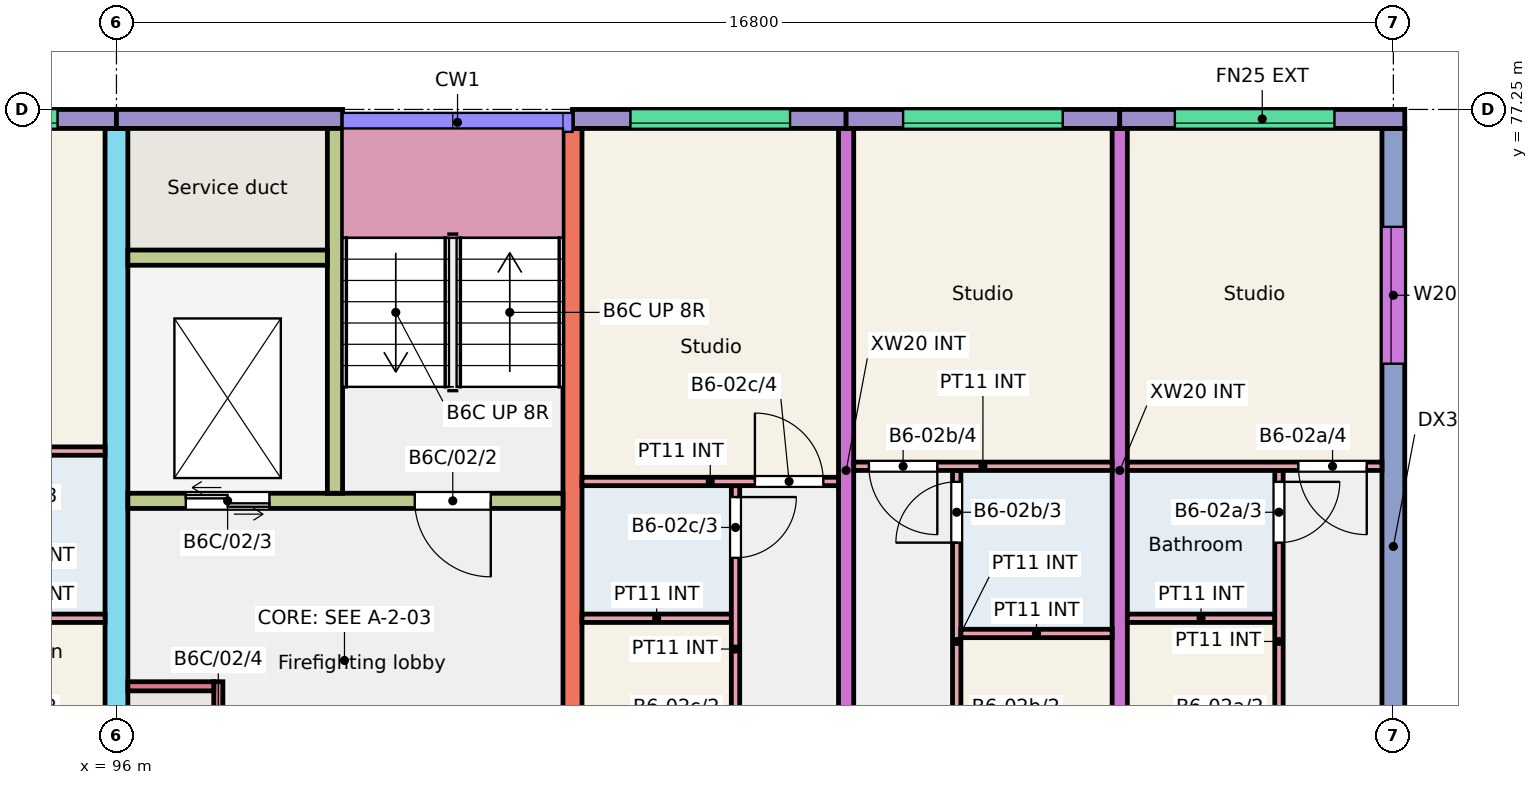
"""IFC4 building model, lengths in metres.
Left out: names, types, materials, properties, quantities, classifications, styles, units other than length and angle.
Written with IfcOpenShell. Run it as: python <this file> out.ifc"""

import sys

from ifc_helpers import new_model, si_unit, direction, frame, frame_2d, origin, place, context, subcontext, project, spatial, rectangle, extrude, element, fill, save


model = new_model("IFC4")
c1 = context("Model", 3, precision=1e-05, world=origin(), true_north=direction((0.0, 1.0)))
c2 = subcontext(c1, "Body", "Model", "MODEL_VIEW")
j1 = project(units=[si_unit("LENGTHUNIT", "METRE"), si_unit("PLANEANGLEUNIT", "RADIAN")], contexts=[c1])
p1 = place(None, origin())
s1 = spatial("IfcSite", under=j1, at=p1, CompositionType="ELEMENT")
p2 = place(p1, origin())
s2 = spatial("IfcBuilding", under=s1, at=p2, CompositionType="ELEMENT")
p3 = place(p2, frame((0.0, 0.0, 6.0)))
s3 = spatial("IfcBuildingStorey", under=s2, at=p3, CompositionType="ELEMENT", Elevation=6.0)
p4 = place(p3, frame((96.0, 66.0, 0.0), z_axis=(0.0, 0.0, 1.0), x_axis=(0.0, 1.0, 0.0)))
e1 = element("IfcWall", 1, at=p4, inside=s3, PredefinedType="SHEAR", context=c2, shape_type="SweptSolid", body=[
    extrude(rectangle(XDim=11.0, YDim=0.3, at=frame_2d((5.5, 0.0))), origin(), (0.0, 0.0, 1.0), 3.0),
])
p5 = place(p4, frame((0.3, 0.0, 0.0)))
e2 = element("IfcOpeningElement", 2, at=p5, cuts=e1, PredefinedType="OPENING", context=c2, shape_type="SweptSolid", body=[
    extrude(rectangle(XDim=1.2, YDim=2.1, at=frame_2d((0.6, 1.05))), frame((0.0, 0.16, 0.0), z_axis=(0.0, -1.0, 0.0), x_axis=(1.0, 0.0, 0.0)), (0.0, 0.0, 1.0), 0.32),
])
p6 = place(p3, frame((102.0, 68.0, 0.0), z_axis=(0.0, 0.0, 1.0), x_axis=(0.0, 1.0, 0.0)))
e3 = element("IfcWall", 3, at=p6, inside=s3, PredefinedType="SHEAR", context=c2, shape_type="SweptSolid", body=[
    extrude(rectangle(XDim=9.0, YDim=0.25, at=frame_2d((4.5, 0.0))), origin(), (0.0, 0.0, 1.0), 3.0),
])
for number, where, z_axis, x_axis in (
    (4, (105.6, 68.0, 0.0), (0.0, 0.0, 1.0), (0.0, 1.0, 0.0)),
    (5, (109.2, 68.0, 0.0), (0.0, 0.0, 1.0), (0.0, 1.0, 0.0)),
):
    element("IfcWall", number, at=place(p3, frame(where, z_axis=z_axis, x_axis=x_axis)), inside=s3, PredefinedType="SHEAR", context=c2, shape_type="SweptSolid", body=[
        extrude(rectangle(XDim=9.0, YDim=0.2, at=frame_2d((4.5, 0.0))), origin(), (0.0, 0.0, 1.0), 3.0),
    ])
p7 = place(p3, frame((112.8, 66.0, 0.0), z_axis=(0.0, 0.0, 1.0), x_axis=(0.0, 1.0, 0.0)))
e6 = element("IfcWall", 6, at=p7, inside=s3, PredefinedType="SHEAR", context=c2, shape_type="SweptSolid", body=[
    extrude(rectangle(XDim=11.0, YDim=0.3, at=frame_2d((5.5, 0.0))), origin(), (0.0, 0.0, 1.0), 3.0),
])
p8 = place(p7, frame((7.905, 0.0, 0.9)))
e7 = element("IfcOpeningElement", 7, at=p8, cuts=e6, PredefinedType="OPENING", context=c2, shape_type="SweptSolid", body=[
    extrude(rectangle(XDim=1.8, YDim=1.5, at=frame_2d((0.9, 0.75))), frame((0.0, 0.16, 0.0), z_axis=(0.0, -1.0, 0.0), x_axis=(1.0, 0.0, 0.0)), (0.0, 0.0, 1.0), 0.32),
])
p9 = place(p3, frame((92.4, 77.125, 0.0), z_axis=(0.0, 0.0, 1.0), x_axis=(1.0, 0.0, 0.0)))
e8 = element("IfcWall", 8, at=p9, inside=s3, PredefinedType="SOLIDWALL", context=c2, shape_type="SweptSolid", body=[
    extrude(rectangle(XDim=3.6, YDim=0.25, at=frame_2d((1.8, 0.0))), origin(), (0.0, 0.0, 1.0), 3.0),
])
p10 = place(p9, frame((0.725, 0.0, 1.2)))
e9 = element("IfcOpeningElement", 9, at=p10, cuts=e8, PredefinedType="OPENING", context=c2, shape_type="SweptSolid", body=[
    extrude(rectangle(XDim=2.1, YDim=1.2, at=frame_2d((1.05, 0.6))), frame((0.0, 0.135, 0.0), z_axis=(0.0, -1.0, 0.0), x_axis=(1.0, 0.0, 0.0)), (0.0, 0.0, 1.0), 0.27),
])
p11 = place(p3, frame((96.0, 77.125, 0.0), z_axis=(0.0, 0.0, 1.0), x_axis=(1.0, 0.0, 0.0)))
e10 = element("IfcWall", 10, at=p11, inside=s3, PredefinedType="SOLIDWALL", context=c2, shape_type="SweptSolid", body=[
    extrude(rectangle(XDim=2.975, YDim=0.25, at=frame_2d((1.488, 0.0))), origin(), (0.0, 0.0, 1.0), 3.0),
])
p12 = place(p3, frame((96.15, 72.1, 0.0), z_axis=(0.0, 0.0, 1.0), x_axis=(1.0, 0.0, 0.0)))
e11 = element("IfcWall", 11, at=p12, inside=s3, PredefinedType="SHEAR", context=c2, shape_type="SweptSolid", body=[
    extrude(rectangle(XDim=5.725, YDim=0.2, at=frame_2d((2.863, 0.0))), origin(), (0.0, 0.0, 1.0), 3.0),
])
p13 = place(p12, frame((3.775, 0.0, 0.0)))
e12 = element("IfcOpeningElement", 12, at=p13, cuts=e11, PredefinedType="OPENING", context=c2, shape_type="SweptSolid", body=[
    extrude(rectangle(XDim=1.0, YDim=2.1, at=frame_2d((0.5, 1.05))), frame((0.0, 0.11, 0.0), z_axis=(0.0, -1.0, 0.0), x_axis=(1.0, 0.0, 0.0)), (0.0, 0.0, 1.0), 0.22),
])
p14 = place(p12, frame((0.762, 0.0, 0.0)))
e13 = element("IfcOpeningElement", 13, at=p14, cuts=e11, PredefinedType="OPENING", context=c2, shape_type="SweptSolid", body=[
    extrude(rectangle(XDim=1.1, YDim=2.1, at=frame_2d((0.55, 1.05))), frame((0.0, 0.11, 0.0), z_axis=(0.0, -1.0, 0.0), x_axis=(1.0, 0.0, 0.0)), (0.0, 0.0, 1.0), 0.22),
])
p15 = place(p3, frame((98.875, 72.2, 0.0), z_axis=(0.0, 0.0, 1.0), x_axis=(0.0, 1.0, 0.0)))
e14 = element("IfcWall", 14, at=p15, inside=s3, PredefinedType="SHEAR", context=c2, shape_type="SweptSolid", body=[
    extrude(rectangle(XDim=4.8, YDim=0.2, at=frame_2d((2.4, 0.0))), origin(), (0.0, 0.0, 1.0), 3.0),
])
p16 = place(p3, frame((96.15, 75.3, 0.0), z_axis=(0.0, 0.0, 1.0), x_axis=(1.0, 0.0, 0.0)))
e15 = element("IfcWall", 15, at=p16, inside=s3, PredefinedType="SHEAR", context=c2, shape_type="SweptSolid", body=[
    extrude(rectangle(XDim=2.625, YDim=0.2, at=frame_2d((1.312, 0.0))), origin(), (0.0, 0.0, 1.0), 3.0),
])
p17 = place(p3, frame((97.34, 68.0, 0.0), z_axis=(0.0, 0.0, 1.0), x_axis=(0.0, 1.0, 0.0)))
e16 = element("IfcWall", 16, at=p17, inside=s3, PredefinedType="SHEAR", context=c2, shape_type="SweptSolid", body=[
    extrude(rectangle(XDim=1.72, YDim=0.12, at=frame_2d((0.86, 0.0))), origin(), (0.0, 0.0, 1.0), 3.0),
])
p18 = place(p17, frame((0.45, 0.0, 0.0)))
e17 = element("IfcOpeningElement", 17, at=p18, cuts=e16, PredefinedType="OPENING", context=c2, shape_type="SweptSolid", body=[
    extrude(rectangle(XDim=0.9, YDim=2.1, at=frame_2d((0.45, 1.05))), frame((0.0, 0.07, 0.0), z_axis=(0.0, -1.0, 0.0), x_axis=(1.0, 0.0, 0.0)), (0.0, 0.0, 1.0), 0.14),
])
p19 = place(p3, frame((96.15, 69.66, 0.0), z_axis=(0.0, 0.0, 1.0), x_axis=(1.0, 0.0, 0.0)))
e18 = element("IfcWall", 18, at=p19, inside=s3, PredefinedType="SHEAR", context=c2, shape_type="SweptSolid", body=[
    extrude(rectangle(XDim=1.13, YDim=0.12, at=frame_2d((0.565, 0.0))), origin(), (0.0, 0.0, 1.0), 3.0),
])
p20 = place(p3, frame((102.0, 77.125, 0.0), z_axis=(0.0, 0.0, 1.0), x_axis=(1.0, 0.0, 0.0)))
e19 = element("IfcWall", 19, at=p20, inside=s3, PredefinedType="SOLIDWALL", context=c2, shape_type="SweptSolid", body=[
    extrude(rectangle(XDim=3.6, YDim=0.25, at=frame_2d((1.8, 0.0))), origin(), (0.0, 0.0, 1.0), 3.0),
])
p21 = place(p20, frame((0.762, 0.0, 1.2)))
e20 = element("IfcOpeningElement", 20, at=p21, cuts=e19, PredefinedType="OPENING", context=c2, shape_type="SweptSolid", body=[
    extrude(rectangle(XDim=2.1, YDim=1.2, at=frame_2d((1.05, 0.6))), frame((0.0, 0.135, 0.0), z_axis=(0.0, -1.0, 0.0), x_axis=(1.0, 0.0, 0.0)), (0.0, 0.0, 1.0), 0.27),
])
p22 = place(p3, frame((105.6, 77.125, 0.0), z_axis=(0.0, 0.0, 1.0), x_axis=(1.0, 0.0, 0.0)))
e21 = element("IfcWall", 21, at=p22, inside=s3, PredefinedType="SOLIDWALL", context=c2, shape_type="SweptSolid", body=[
    extrude(rectangle(XDim=3.6, YDim=0.25, at=frame_2d((1.8, 0.0))), origin(), (0.0, 0.0, 1.0), 3.0),
])
p23 = place(p22, frame((0.75, 0.0, 1.2)))
e22 = element("IfcOpeningElement", 22, at=p23, cuts=e21, PredefinedType="OPENING", context=c2, shape_type="SweptSolid", body=[
    extrude(rectangle(XDim=2.1, YDim=1.2, at=frame_2d((1.05, 0.6))), frame((0.0, 0.135, 0.0), z_axis=(0.0, -1.0, 0.0), x_axis=(1.0, 0.0, 0.0)), (0.0, 0.0, 1.0), 0.27),
])
p24 = place(p3, frame((109.2, 77.125, 0.0), z_axis=(0.0, 0.0, 1.0), x_axis=(1.0, 0.0, 0.0)))
e23 = element("IfcWall", 23, at=p24, inside=s3, PredefinedType="SOLIDWALL", context=c2, shape_type="SweptSolid", body=[
    extrude(rectangle(XDim=3.75, YDim=0.25, at=frame_2d((1.875, 0.0))), origin(), (0.0, 0.0, 1.0), 3.0),
])
p25 = place(p24, frame((0.725, 0.0, 1.2)))
e24 = element("IfcOpeningElement", 24, at=p25, cuts=e23, PredefinedType="OPENING", context=c2, shape_type="SweptSolid", body=[
    extrude(rectangle(XDim=2.1, YDim=1.2, at=frame_2d((1.05, 0.6))), frame((0.0, 0.135, 0.0), z_axis=(0.0, -1.0, 0.0), x_axis=(1.0, 0.0, 0.0)), (0.0, 0.0, 1.0), 0.27),
])
p26 = place(p3, frame((93.91, 70.555, 0.0), z_axis=(0.0, 0.0, 1.0), x_axis=(1.0, 0.0, 0.0)))
e25 = element("IfcWall", 25, at=p26, inside=s3, PredefinedType="PARTITIONING", context=c2, shape_type="SweptSolid", body=[
    extrude(rectangle(XDim=1.94, YDim=0.11, at=frame_2d((0.97, 0.0))), origin(), (0.0, 0.0, 1.0), 2.8),
])
p27 = place(p3, frame((92.5, 72.755, 0.0), z_axis=(0.0, 0.0, 1.0), x_axis=(1.0, 0.0, 0.0)))
e26 = element("IfcWall", 26, at=p27, inside=s3, PredefinedType="PARTITIONING", context=c2, shape_type="SweptSolid", body=[
    extrude(rectangle(XDim=3.35, YDim=0.11, at=frame_2d((1.675, 0.0))), origin(), (0.0, 0.0, 1.0), 2.8),
])
p28 = place(p27, frame((0.2, 0.0, 0.0)))
e27 = element("IfcOpeningElement", 27, at=p28, cuts=e26, PredefinedType="OPENING", context=c2, shape_type="SweptSolid", body=[
    extrude(rectangle(XDim=0.9, YDim=2.1, at=frame_2d((0.45, 1.05))), frame((0.0, 0.065, 0.0), z_axis=(0.0, -1.0, 0.0), x_axis=(1.0, 0.0, 0.0)), (0.0, 0.0, 1.0), 0.13),
])
p29 = place(p3, frame((109.3, 70.555, 0.0), z_axis=(0.0, 0.0, 1.0), x_axis=(1.0, 0.0, 0.0)))
e28 = element("IfcWall", 28, at=p29, inside=s3, PredefinedType="PARTITIONING", context=c2, shape_type="SweptSolid", body=[
    extrude(rectangle(XDim=1.94, YDim=0.11, at=frame_2d((0.97, 0.0))), origin(), (0.0, 0.0, 1.0), 2.8),
])
p30 = place(p3, frame((111.295, 68.0, 0.0), z_axis=(0.0, 0.0, 1.0), x_axis=(0.0, 1.0, 0.0)))
e29 = element("IfcWall", 29, at=p30, inside=s3, PredefinedType="PARTITIONING", context=c2, shape_type="SweptSolid", body=[
    extrude(rectangle(XDim=4.5, YDim=0.11, at=frame_2d((2.25, 0.0))), origin(), (0.0, 0.0, 1.0), 2.8),
])
p31 = place(p30, frame((0.2, 0.0, 0.0)))
e30 = element("IfcOpeningElement", 30, at=p31, cuts=e29, PredefinedType="OPENING", context=c2, shape_type="SweptSolid", body=[
    extrude(rectangle(XDim=0.8, YDim=2.1, at=frame_2d((0.4, 1.05))), frame((0.0, 0.065, 0.0), z_axis=(0.0, -1.0, 0.0), x_axis=(1.0, 0.0, 0.0)), (0.0, 0.0, 1.0), 0.13),
])
p32 = place(p30, frame((3.55, 0.0, 0.0)))
e31 = element("IfcOpeningElement", 31, at=p32, cuts=e29, PredefinedType="OPENING", context=c2, shape_type="SweptSolid", body=[
    extrude(rectangle(XDim=0.8, YDim=2.1, at=frame_2d((0.4, 1.05))), frame((0.0, 0.065, 0.0), z_axis=(0.0, -1.0, 0.0), x_axis=(1.0, 0.0, 0.0)), (0.0, 0.0, 1.0), 0.13),
])
p33 = place(p3, frame((109.3, 72.555, 0.0), z_axis=(0.0, 0.0, 1.0), x_axis=(1.0, 0.0, 0.0)))
e32 = element("IfcWall", 32, at=p33, inside=s3, PredefinedType="PARTITIONING", context=c2, shape_type="SweptSolid", body=[
    extrude(rectangle(XDim=3.35, YDim=0.11, at=frame_2d((1.675, 0.0))), origin(), (0.0, 0.0, 1.0), 2.8),
])
p34 = place(p33, frame((2.25, 0.0, 0.0)))
e33 = element("IfcOpeningElement", 33, at=p34, cuts=e32, PredefinedType="OPENING", context=c2, shape_type="SweptSolid", body=[
    extrude(rectangle(XDim=0.9, YDim=2.1, at=frame_2d((0.45, 1.05))), frame((0.0, 0.065, 0.0), z_axis=(0.0, -1.0, 0.0), x_axis=(1.0, 0.0, 0.0)), (0.0, 0.0, 1.0), 0.13),
])
p35 = place(p3, frame((107.055, 68.0, 0.0), z_axis=(0.0, 0.0, 1.0), x_axis=(0.0, 1.0, 0.0)))
e34 = element("IfcWall", 34, at=p35, inside=s3, PredefinedType="PARTITIONING", context=c2, shape_type="SweptSolid", body=[
    extrude(rectangle(XDim=4.5, YDim=0.11, at=frame_2d((2.25, 0.0))), origin(), (0.0, 0.0, 1.0), 2.8),
])
p36 = place(p35, frame((0.2, 0.0, 0.0)))
e35 = element("IfcOpeningElement", 35, at=p36, cuts=e34, PredefinedType="OPENING", context=c2, shape_type="SweptSolid", body=[
    extrude(rectangle(XDim=0.8, YDim=2.1, at=frame_2d((0.4, 1.05))), frame((0.0, 0.065, 0.0), z_axis=(0.0, -1.0, 0.0), x_axis=(1.0, 0.0, 0.0)), (0.0, 0.0, 1.0), 0.13),
])
p37 = place(p35, frame((3.55, 0.0, 0.0)))
e36 = element("IfcOpeningElement", 36, at=p37, cuts=e34, PredefinedType="OPENING", context=c2, shape_type="SweptSolid", body=[
    extrude(rectangle(XDim=0.8, YDim=2.1, at=frame_2d((0.4, 1.05))), frame((0.0, 0.065, 0.0), z_axis=(0.0, -1.0, 0.0), x_axis=(1.0, 0.0, 0.0)), (0.0, 0.0, 1.0), 0.13),
])
p38 = place(p3, frame((107.11, 70.355, 0.0), z_axis=(0.0, 0.0, 1.0), x_axis=(1.0, 0.0, 0.0)))
e37 = element("IfcWall", 37, at=p38, inside=s3, PredefinedType="PARTITIONING", context=c2, shape_type="SweptSolid", body=[
    extrude(rectangle(XDim=1.99, YDim=0.11, at=frame_2d((0.995, 0.0))), origin(), (0.0, 0.0, 1.0), 2.8),
])
p39 = place(p3, frame((105.7, 72.555, 0.0), z_axis=(0.0, 0.0, 1.0), x_axis=(1.0, 0.0, 0.0)))
e38 = element("IfcWall", 38, at=p39, inside=s3, PredefinedType="PARTITIONING", context=c2, shape_type="SweptSolid", body=[
    extrude(rectangle(XDim=3.4, YDim=0.11, at=frame_2d((1.7, 0.0))), origin(), (0.0, 0.0, 1.0), 2.8),
])
p40 = place(p39, frame((0.2, 0.0, 0.0)))
e39 = element("IfcOpeningElement", 39, at=p40, cuts=e38, PredefinedType="OPENING", context=c2, shape_type="SweptSolid", body=[
    extrude(rectangle(XDim=0.9, YDim=2.1, at=frame_2d((0.45, 1.05))), frame((0.0, 0.065, 0.0), z_axis=(0.0, -1.0, 0.0), x_axis=(1.0, 0.0, 0.0)), (0.0, 0.0, 1.0), 0.13),
])
p41 = place(p3, frame((102.125, 70.555, 0.0), z_axis=(0.0, 0.0, 1.0), x_axis=(1.0, 0.0, 0.0)))
e40 = element("IfcWall", 40, at=p41, inside=s3, PredefinedType="PARTITIONING", context=c2, shape_type="SweptSolid", body=[
    extrude(rectangle(XDim=1.965, YDim=0.11, at=frame_2d((0.982, 0.0))), origin(), (0.0, 0.0, 1.0), 2.8),
])
p42 = place(p3, frame((104.145, 68.0, 0.0), z_axis=(0.0, 0.0, 1.0), x_axis=(0.0, 1.0, 0.0)))
e41 = element("IfcWall", 41, at=p42, inside=s3, PredefinedType="PARTITIONING", context=c2, shape_type="SweptSolid", body=[
    extrude(rectangle(XDim=4.3, YDim=0.11, at=frame_2d((2.15, 0.0))), origin(), (0.0, 0.0, 1.0), 2.8),
])
p43 = place(p42, frame((0.2, 0.0, 0.0)))
e42 = element("IfcOpeningElement", 42, at=p43, cuts=e41, PredefinedType="OPENING", context=c2, shape_type="SweptSolid", body=[
    extrude(rectangle(XDim=0.8, YDim=2.1, at=frame_2d((0.4, 1.05))), frame((0.0, 0.065, 0.0), z_axis=(0.0, -1.0, 0.0), x_axis=(1.0, 0.0, 0.0)), (0.0, 0.0, 1.0), 0.13),
])
p44 = place(p42, frame((3.35, 0.0, 0.0)))
e43 = element("IfcOpeningElement", 43, at=p44, cuts=e41, PredefinedType="OPENING", context=c2, shape_type="SweptSolid", body=[
    extrude(rectangle(XDim=0.8, YDim=2.1, at=frame_2d((0.4, 1.05))), frame((0.0, 0.065, 0.0), z_axis=(0.0, -1.0, 0.0), x_axis=(1.0, 0.0, 0.0)), (0.0, 0.0, 1.0), 0.13),
])
p45 = place(p3, frame((102.125, 72.355, 0.0), z_axis=(0.0, 0.0, 1.0), x_axis=(1.0, 0.0, 0.0)))
e44 = element("IfcWall", 44, at=p45, inside=s3, PredefinedType="PARTITIONING", context=c2, shape_type="SweptSolid", body=[
    extrude(rectangle(XDim=3.375, YDim=0.11, at=frame_2d((1.688, 0.0))), origin(), (0.0, 0.0, 1.0), 2.8),
])
p46 = place(p45, frame((2.275, 0.0, 0.0)))
e45 = element("IfcOpeningElement", 45, at=p46, cuts=e44, PredefinedType="OPENING", context=c2, shape_type="SweptSolid", body=[
    extrude(rectangle(XDim=0.9, YDim=2.1, at=frame_2d((0.45, 1.05))), frame((0.0, 0.065, 0.0), z_axis=(0.0, -1.0, 0.0), x_axis=(1.0, 0.0, 0.0)), (0.0, 0.0, 1.0), 0.13),
])
p47 = place(p10, origin())
e46 = element("IfcWindow", 46, at=p47, inside=s3, PartitioningType="SINGLE_PANEL", PredefinedType="WINDOW", context=c2, shape_type="SweptSolid", body=[
    extrude(rectangle(XDim=2.1, YDim=1.2, at=frame_2d((1.05, 0.6))), frame((0.0, -0.025, 0.0), z_axis=(0.0, -1.0, 0.0), x_axis=(1.0, 0.0, 0.0)), (0.0, 0.0, 1.0), 0.06),
])
fill(e9, e46)
p48 = place(p25, origin())
e47 = element("IfcWindow", 47, at=p48, inside=s3, PartitioningType="SINGLE_PANEL", PredefinedType="WINDOW", context=c2, shape_type="SweptSolid", body=[
    extrude(rectangle(XDim=2.1, YDim=1.2, at=frame_2d((1.05, 0.6))), frame((0.0, -0.025, 0.0), z_axis=(0.0, -1.0, 0.0), x_axis=(1.0, 0.0, 0.0)), (0.0, 0.0, 1.0), 0.06),
])
fill(e24, e47)
p49 = place(p8, origin())
e48 = element("IfcWindow", 48, at=p49, inside=s3, PartitioningType="SINGLE_PANEL", PredefinedType="WINDOW", context=c2, shape_type="SweptSolid", body=[
    extrude(rectangle(XDim=1.8, YDim=1.5, at=frame_2d((0.9, 0.75))), frame((0.0, 0.06, 0.0), z_axis=(0.0, -1.0, 0.0), x_axis=(1.0, 0.0, 0.0)), (0.0, 0.0, 1.0), 0.06),
])
fill(e7, e48)
p50 = place(p23, origin())
e49 = element("IfcWindow", 49, at=p50, inside=s3, PartitioningType="SINGLE_PANEL", PredefinedType="WINDOW", context=c2, shape_type="SweptSolid", body=[
    extrude(rectangle(XDim=2.1, YDim=1.2, at=frame_2d((1.05, 0.6))), frame((0.0, -0.025, 0.0), z_axis=(0.0, -1.0, 0.0), x_axis=(1.0, 0.0, 0.0)), (0.0, 0.0, 1.0), 0.06),
])
fill(e22, e49)
p51 = place(p21, origin())
e50 = element("IfcWindow", 50, at=p51, inside=s3, PartitioningType="SINGLE_PANEL", PredefinedType="WINDOW", context=c2, shape_type="SweptSolid", body=[
    extrude(rectangle(XDim=2.1, YDim=1.2, at=frame_2d((1.05, 0.6))), frame((0.0, -0.025, 0.0), z_axis=(0.0, -1.0, 0.0), x_axis=(1.0, 0.0, 0.0)), (0.0, 0.0, 1.0), 0.06),
])
fill(e20, e50)
p52 = place(p32, origin())
e51 = element("IfcDoor", 51, at=p52, inside=s3, OperationType="SINGLE_SWING_RIGHT", PredefinedType="DOOR", context=c2, shape_type="SweptSolid", body=[
    extrude(rectangle(XDim=0.8, YDim=2.1, at=frame_2d((0.4, 1.05))), frame((0.0, 0.025, 0.0), z_axis=(0.0, -1.0, 0.0), x_axis=(1.0, 0.0, 0.0)), (0.0, 0.0, 1.0), 0.05),
])
fill(e31, e51)
p53 = place(p34, origin())
e52 = element("IfcDoor", 52, at=p53, inside=s3, OperationType="SINGLE_SWING_RIGHT", PredefinedType="DOOR", context=c2, shape_type="SweptSolid", body=[
    extrude(rectangle(XDim=0.9, YDim=2.1, at=frame_2d((0.45, 1.05))), frame((0.0, 0.025, 0.0), z_axis=(0.0, -1.0, 0.0), x_axis=(1.0, 0.0, 0.0)), (0.0, 0.0, 1.0), 0.05),
])
fill(e33, e52)
p54 = place(p37, origin())
e53 = element("IfcDoor", 53, at=p54, inside=s3, OperationType="SINGLE_SWING_LEFT", PredefinedType="DOOR", context=c2, shape_type="SweptSolid", body=[
    extrude(rectangle(XDim=0.8, YDim=2.1, at=frame_2d((0.4, 1.05))), frame((0.0, 0.025, 0.0), z_axis=(0.0, -1.0, 0.0), x_axis=(1.0, 0.0, 0.0)), (0.0, 0.0, 1.0), 0.05),
])
fill(e36, e53)
p55 = place(p40, origin())
e54 = element("IfcDoor", 54, at=p55, inside=s3, OperationType="SINGLE_SWING_RIGHT", PredefinedType="DOOR", context=c2, shape_type="SweptSolid", body=[
    extrude(rectangle(XDim=0.9, YDim=2.1, at=frame_2d((0.45, 1.05))), frame((0.0, 0.025, 0.0), z_axis=(0.0, -1.0, 0.0), x_axis=(1.0, 0.0, 0.0)), (0.0, 0.0, 1.0), 0.05),
])
fill(e39, e54)
p56 = place(p44, origin())
e55 = element("IfcDoor", 55, at=p56, inside=s3, OperationType="SINGLE_SWING_RIGHT", PredefinedType="DOOR", context=c2, shape_type="SweptSolid", body=[
    extrude(rectangle(XDim=0.8, YDim=2.1, at=frame_2d((0.4, 1.05))), frame((0.0, 0.025, 0.0), z_axis=(0.0, -1.0, 0.0), x_axis=(1.0, 0.0, 0.0)), (0.0, 0.0, 1.0), 0.05),
])
fill(e43, e55)
p57 = place(p46, origin())
e56 = element("IfcDoor", 56, at=p57, inside=s3, OperationType="SINGLE_SWING_LEFT", PredefinedType="DOOR", context=c2, shape_type="SweptSolid", body=[
    extrude(rectangle(XDim=0.9, YDim=2.1, at=frame_2d((0.45, 1.05))), frame((0.0, 0.025, 0.0), z_axis=(0.0, -1.0, 0.0), x_axis=(1.0, 0.0, 0.0)), (0.0, 0.0, 1.0), 0.05),
])
fill(e45, e56)
p58 = place(p13, origin())
e57 = element("IfcDoor", 57, at=p58, inside=s3, OperationType="SINGLE_SWING_RIGHT", PredefinedType="DOOR", context=c2, shape_type="SweptSolid", body=[
    extrude(rectangle(XDim=1.0, YDim=2.1, at=frame_2d((0.5, 1.05))), frame((0.0, 0.025, 0.0), z_axis=(0.0, -1.0, 0.0), x_axis=(1.0, 0.0, 0.0)), (0.0, 0.0, 1.0), 0.05),
])
fill(e12, e57)
p59 = place(p14, origin())
e58 = element("IfcDoor", 58, at=p59, inside=s3, OperationType="DOUBLE_DOOR_SLIDING", PredefinedType="DOOR", context=c2, shape_type="SweptSolid", body=[
    extrude(rectangle(XDim=1.1, YDim=2.1, at=frame_2d((0.55, 1.05))), frame((0.0, 0.025, 0.0), z_axis=(0.0, -1.0, 0.0), x_axis=(1.0, 0.0, 0.0)), (0.0, 0.0, 1.0), 0.05),
])
fill(e13, e58)
save(model, sys.argv[1])
